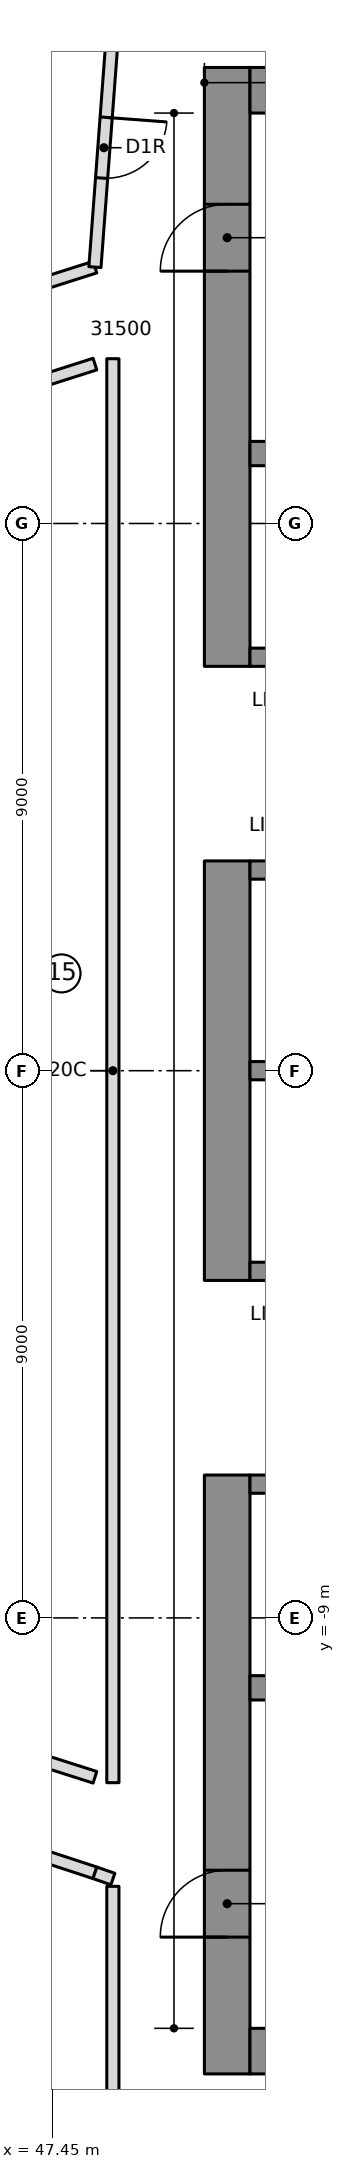
"""IFC4 building model, lengths in metres.
Left out: names, types, materials, properties, quantities, classifications, styles, units other than length and angle.
Written with IfcOpenShell. Run it as: python <this file> out.ifc"""

import sys

from ifc_helpers import new_model, si_unit, direction, frame, frame_2d, origin, place, context, subcontext, project, spatial, rectangle, extrude, element, fill, save


model = new_model("IFC4")
c1 = context("Model", 3, precision=1e-05, world=origin(), true_north=direction((0.0, 1.0)))
c2 = subcontext(c1, "Body", "Model", "MODEL_VIEW")
j1 = project(units=[si_unit("LENGTHUNIT", "METRE"), si_unit("PLANEANGLEUNIT", "RADIAN")], contexts=[c1])
p1 = place(None, origin())
s1 = spatial("IfcSite", under=j1, at=p1, CompositionType="ELEMENT")
p2 = place(p1, origin())
s2 = spatial("IfcBuilding", under=s1, at=p2, CompositionType="ELEMENT")
p3 = place(p2, frame((0.0, 0.0, 203.9)))
s3 = spatial("IfcBuildingStorey", under=s2, at=p3, CompositionType="ELEMENT", Elevation=203.9)
p4 = place(p3, frame((50.325, 6.65, 0.0), z_axis=(0.0, 0.0, 1.0), x_axis=(0.0, 1.0, 0.0)))
e1 = element("IfcWall", 1, at=p4, inside=s3, PredefinedType="SHEAR", context=c2, shape_type="SweptSolid", body=[
    extrude(rectangle(XDim=9.85, YDim=0.75, at=frame_2d((4.925, 0.0))), origin(), (0.0, 0.0, 1.0), 3.55),
])
p5 = place(p4, frame((6.5, 0.0, 0.0)))
e2 = element("IfcOpeningElement", 2, at=p5, cuts=e1, PredefinedType="OPENING", context=c2, shape_type="SweptSolid", body=[
    extrude(rectangle(XDim=1.1, YDim=2.1, at=frame_2d((0.55, 1.05))), frame((0.0, 0.385, 0.0), z_axis=(0.0, -1.0, 0.0), x_axis=(1.0, 0.0, 0.0)), (0.0, 0.0, 1.0), 0.77),
])
p6 = place(p3, frame((50.325, -3.45, 0.0), z_axis=(0.0, 0.0, 1.0), x_axis=(0.0, 1.0, 0.0)))
e3 = element("IfcWall", 3, at=p6, inside=s3, PredefinedType="SHEAR", context=c2, shape_type="SweptSolid", body=[
    extrude(rectangle(XDim=6.9, YDim=0.75, at=frame_2d((3.45, 0.0))), origin(), (0.0, 0.0, 1.0), 3.55),
])
p7 = place(p3, frame((50.325, -16.5, 0.0), z_axis=(0.0, 0.0, 1.0), x_axis=(0.0, 1.0, 0.0)))
e4 = element("IfcWall", 4, at=p7, inside=s3, PredefinedType="SHEAR", context=c2, shape_type="SweptSolid", body=[
    extrude(rectangle(XDim=9.85, YDim=0.75, at=frame_2d((4.925, 0.0))), origin(), (0.0, 0.0, 1.0), 3.55),
])
p8 = place(p7, frame((2.25, 0.0, 0.0)))
e5 = element("IfcOpeningElement", 5, at=p8, cuts=e4, PredefinedType="OPENING", context=c2, shape_type="SweptSolid", body=[
    extrude(rectangle(XDim=1.1, YDim=2.1, at=frame_2d((0.55, 1.05))), frame((0.0, 0.385, 0.0), z_axis=(0.0, -1.0, 0.0), x_axis=(1.0, 0.0, 0.0)), (0.0, 0.0, 1.0), 0.77),
])
for number, where, z_axis, x_axis in (
    (6, (50.7, 16.125, 0.0), (0.0, 0.0, 1.0), (1.0, 0.0, 0.0)),
    (7, (50.7, -16.125, 0.0), (0.0, 0.0, 1.0), (1.0, 0.0, 0.0)),
):
    element("IfcWall", number, at=place(p3, frame(where, z_axis=z_axis, x_axis=x_axis)), inside=s3, PredefinedType="SHEAR", context=c2, shape_type="SweptSolid", body=[
        extrude(rectangle(XDim=13.77, YDim=0.75, at=frame_2d((6.885, 0.0))), origin(), (0.0, 0.0, 1.0), 3.55),
    ])
p9 = place(p3, frame((50.7, 10.15, 0.0), z_axis=(0.0, 0.0, 1.0), x_axis=(1.0, 0.0, 0.0)))
e8 = element("IfcWall", 8, at=p9, inside=s3, PredefinedType="SHEAR", context=c2, shape_type="SweptSolid", body=[
    extrude(rectangle(XDim=13.02, YDim=0.4, at=frame_2d((6.51, 0.0))), origin(), (0.0, 0.0, 1.0), 3.55),
])
p10 = place(p9, frame((0.7, 0.0, 0.0)))
e9 = element("IfcOpeningElement", 9, at=p10, cuts=e8, PredefinedType="OPENING", context=c2, shape_type="SweptSolid", body=[
    extrude(rectangle(XDim=1.1, YDim=2.1, at=frame_2d((0.55, 1.05))), frame((0.0, 0.21, 0.0), z_axis=(0.0, -1.0, 0.0), x_axis=(1.0, 0.0, 0.0)), (0.0, 0.0, 1.0), 0.42),
])
p11 = place(p9, frame((3.5, 0.0, 0.0)))
e10 = element("IfcOpeningElement", 10, at=p11, cuts=e8, PredefinedType="OPENING", context=c2, shape_type="SweptSolid", body=[
    extrude(rectangle(XDim=1.1, YDim=2.1, at=frame_2d((0.55, 1.05))), frame((0.0, 0.21, 0.0), z_axis=(0.0, -1.0, 0.0), x_axis=(1.0, 0.0, 0.0)), (0.0, 0.0, 1.0), 0.42),
])
p12 = place(p3, frame((50.7, -10.15, 0.0), z_axis=(0.0, 0.0, 1.0), x_axis=(1.0, 0.0, 0.0)))
e11 = element("IfcWall", 11, at=p12, inside=s3, PredefinedType="SHEAR", context=c2, shape_type="SweptSolid", body=[
    extrude(rectangle(XDim=13.02, YDim=0.4, at=frame_2d((6.51, 0.0))), origin(), (0.0, 0.0, 1.0), 3.55),
])
p13 = place(p3, frame((50.7, 0.0, 0.0), z_axis=(0.0, 0.0, 1.0), x_axis=(1.0, 0.0, 0.0)))
e12 = element("IfcWall", 12, at=p13, inside=s3, PredefinedType="SHEAR", context=c2, shape_type="SweptSolid", body=[
    extrude(rectangle(XDim=10.9, YDim=0.3, at=frame_2d((5.45, 0.0))), origin(), (0.0, 0.0, 1.0), 3.55),
])
p14 = place(p3, frame((50.7, 3.3, 0.0), z_axis=(0.0, 0.0, 1.0), x_axis=(1.0, 0.0, 0.0)))
e13 = element("IfcWall", 13, at=p14, inside=s3, PredefinedType="SHEAR", context=c2, shape_type="SweptSolid", body=[
    extrude(rectangle(XDim=10.9, YDim=0.3, at=frame_2d((5.45, 0.0))), origin(), (0.0, 0.0, 1.0), 3.55),
])
p15 = place(p14, frame((0.7, 0.0, 0.0)))
e14 = element("IfcOpeningElement", 14, at=p15, cuts=e13, PredefinedType="OPENING", context=c2, shape_type="SweptSolid", body=[
    extrude(rectangle(XDim=1.1, YDim=2.1, at=frame_2d((0.55, 1.05))), frame((0.0, 0.16, 0.0), z_axis=(0.0, -1.0, 0.0), x_axis=(1.0, 0.0, 0.0)), (0.0, 0.0, 1.0), 0.32),
])
p16 = place(p14, frame((3.5, 0.0, 0.0)))
e15 = element("IfcOpeningElement", 15, at=p16, cuts=e13, PredefinedType="OPENING", context=c2, shape_type="SweptSolid", body=[
    extrude(rectangle(XDim=1.1, YDim=2.1, at=frame_2d((0.55, 1.05))), frame((0.0, 0.16, 0.0), z_axis=(0.0, -1.0, 0.0), x_axis=(1.0, 0.0, 0.0)), (0.0, 0.0, 1.0), 0.32),
])
p17 = place(p14, frame((6.3, 0.0, 0.0)))
e16 = element("IfcOpeningElement", 16, at=p17, cuts=e13, PredefinedType="OPENING", context=c2, shape_type="SweptSolid", body=[
    extrude(rectangle(XDim=1.1, YDim=2.1, at=frame_2d((0.55, 1.05))), frame((0.0, 0.16, 0.0), z_axis=(0.0, -1.0, 0.0), x_axis=(1.0, 0.0, 0.0)), (0.0, 0.0, 1.0), 0.32),
])
p18 = place(p14, frame((9.1, 0.0, 0.0)))
e17 = element("IfcOpeningElement", 17, at=p18, cuts=e13, PredefinedType="OPENING", context=c2, shape_type="SweptSolid", body=[
    extrude(rectangle(XDim=1.1, YDim=2.1, at=frame_2d((0.55, 1.05))), frame((0.0, 0.16, 0.0), z_axis=(0.0, -1.0, 0.0), x_axis=(1.0, 0.0, 0.0)), (0.0, 0.0, 1.0), 0.32),
])
p19 = place(p3, frame((50.7, 6.8, 0.0), z_axis=(0.0, 0.0, 1.0), x_axis=(1.0, 0.0, 0.0)))
e18 = element("IfcWall", 18, at=p19, inside=s3, PredefinedType="SHEAR", context=c2, shape_type="SweptSolid", body=[
    extrude(rectangle(XDim=10.9, YDim=0.3, at=frame_2d((5.45, 0.0))), origin(), (0.0, 0.0, 1.0), 3.55),
])
p20 = place(p19, frame((6.4, 0.0, 0.0)))
e19 = element("IfcOpeningElement", 19, at=p20, cuts=e18, PredefinedType="OPENING", context=c2, shape_type="SweptSolid", body=[
    extrude(rectangle(XDim=0.9, YDim=2.1, at=frame_2d((0.45, 1.05))), frame((0.0, 0.16, 0.0), z_axis=(0.0, -1.0, 0.0), x_axis=(1.0, 0.0, 0.0)), (0.0, 0.0, 1.0), 0.32),
])
p21 = place(p19, frame((9.2, 0.0, 0.0)))
e20 = element("IfcOpeningElement", 20, at=p21, cuts=e18, PredefinedType="OPENING", context=c2, shape_type="SweptSolid", body=[
    extrude(rectangle(XDim=0.9, YDim=2.1, at=frame_2d((0.45, 1.05))), frame((0.0, 0.16, 0.0), z_axis=(0.0, -1.0, 0.0), x_axis=(1.0, 0.0, 0.0)), (0.0, 0.0, 1.0), 0.32),
])
p22 = place(p3, frame((50.7, -3.3, 0.0), z_axis=(0.0, 0.0, 1.0), x_axis=(1.0, 0.0, 0.0)))
e21 = element("IfcWall", 21, at=p22, inside=s3, PredefinedType="SHEAR", context=c2, shape_type="SweptSolid", body=[
    extrude(rectangle(XDim=10.9, YDim=0.3, at=frame_2d((5.45, 0.0))), origin(), (0.0, 0.0, 1.0), 3.55),
])
p23 = place(p22, frame((9.1, 0.0, 0.0)))
e22 = element("IfcOpeningElement", 22, at=p23, cuts=e21, PredefinedType="OPENING", context=c2, shape_type="SweptSolid", body=[
    extrude(rectangle(XDim=1.1, YDim=2.1, at=frame_2d((0.55, 1.05))), frame((0.0, 0.16, 0.0), z_axis=(0.0, -1.0, 0.0), x_axis=(1.0, 0.0, 0.0)), (0.0, 0.0, 1.0), 0.32),
])
p24 = place(p3, frame((50.7, -6.8, 0.0), z_axis=(0.0, 0.0, 1.0), x_axis=(1.0, 0.0, 0.0)))
e23 = element("IfcWall", 23, at=p24, inside=s3, PredefinedType="SHEAR", context=c2, shape_type="SweptSolid", body=[
    extrude(rectangle(XDim=10.9, YDim=0.3, at=frame_2d((5.45, 0.0))), origin(), (0.0, 0.0, 1.0), 3.55),
])
p25 = place(p24, frame((6.3, 0.0, 0.0)))
e24 = element("IfcOpeningElement", 24, at=p25, cuts=e23, PredefinedType="OPENING", context=c2, shape_type="SweptSolid", body=[
    extrude(rectangle(XDim=1.1, YDim=2.1, at=frame_2d((0.55, 1.05))), frame((0.0, 0.16, 0.0), z_axis=(0.0, -1.0, 0.0), x_axis=(1.0, 0.0, 0.0)), (0.0, 0.0, 1.0), 0.32),
])
p26 = place(p24, frame((9.1, 0.0, 0.0)))
e25 = element("IfcOpeningElement", 25, at=p26, cuts=e23, PredefinedType="OPENING", context=c2, shape_type="SweptSolid", body=[
    extrude(rectangle(XDim=1.1, YDim=2.1, at=frame_2d((0.55, 1.05))), frame((0.0, 0.16, 0.0), z_axis=(0.0, -1.0, 0.0), x_axis=(1.0, 0.0, 0.0)), (0.0, 0.0, 1.0), 0.32),
])
p27 = place(p24, frame((0.8, 0.0, 0.0)))
e26 = element("IfcOpeningElement", 26, at=p27, cuts=e23, PredefinedType="OPENING", context=c2, shape_type="SweptSolid", body=[
    extrude(rectangle(XDim=0.9, YDim=2.1, at=frame_2d((0.45, 1.05))), frame((0.0, 0.16, 0.0), z_axis=(0.0, -1.0, 0.0), x_axis=(1.0, 0.0, 0.0)), (0.0, 0.0, 1.0), 0.32),
])
p28 = place(p24, frame((3.6, 0.0, 0.0)))
e27 = element("IfcOpeningElement", 27, at=p28, cuts=e23, PredefinedType="OPENING", context=c2, shape_type="SweptSolid", body=[
    extrude(rectangle(XDim=0.9, YDim=2.1, at=frame_2d((0.45, 1.05))), frame((0.0, 0.16, 0.0), z_axis=(0.0, -1.0, 0.0), x_axis=(1.0, 0.0, 0.0)), (0.0, 0.0, 1.0), 0.32),
])
p29 = place(p3, frame((48.15, 13.217, 0.0), z_axis=(0.0, 0.0, 1.0), x_axis=(-0.952731090451, -0.303814860215, 0.0)))
e28 = element("IfcWall", 28, at=p29, inside=s3, PredefinedType="PARTITIONING", context=c2, shape_type="SweptSolid", body=[
    extrude(rectangle(XDim=1.088, YDim=0.2, at=frame_2d((0.544, 0.0))), origin(), (0.0, 0.0, 1.0), 3.25),
])
p30 = place(p3, frame((43.026, -11.507, 0.0), z_axis=(0.0, 0.0, 1.0), x_axis=(0.949951949432, -0.312396052744, 0.0)))
e29 = element("IfcWall", 29, at=p30, inside=s3, PredefinedType="PARTITIONING", context=c2, shape_type="SweptSolid", body=[
    extrude(rectangle(XDim=5.394, YDim=0.2, at=frame_2d((2.697, 0.0))), origin(), (0.0, 0.0, 1.0), 3.25),
])
p31 = place(p30, frame((3.05, 0.0, 0.0)))
e30 = element("IfcOpeningElement", 30, at=p31, cuts=e29, PredefinedType="OPENING", context=c2, shape_type="SweptSolid", body=[
    extrude(rectangle(XDim=1.0, YDim=2.1, at=frame_2d((0.5, 1.05))), frame((0.0, 0.11, 0.0), z_axis=(0.0, -1.0, 0.0), x_axis=(1.0, 0.0, 0.0)), (0.0, 0.0, 1.0), 0.22),
])
for number, where, z_axis, x_axis in (
    (31, (46.881, 11.217, 0.0), (0.0, 0.0, 1.0), (0.953, 0.304, 0.0)),
    (32, (48.15, -11.621, 0.0), (0.0, 0.0, 1.0), (-0.953, 0.304, 0.0)),
):
    element("IfcWall", number, at=place(p3, frame(where, z_axis=z_axis, x_axis=x_axis)), inside=s3, PredefinedType="PARTITIONING", context=c2, shape_type="SweptSolid", body=[
        extrude(rectangle(XDim=1.332, YDim=0.2, at=frame_2d((0.666, 0.0))), origin(), (0.0, 0.0, 1.0), 3.25),
    ])
p32 = place(p3, frame((48.445, 17.145, 0.0), z_axis=(0.0, 0.0, 1.0), x_axis=(-0.074933243819, -0.997188552366, 0.0)))
e33 = element("IfcWall", 33, at=p32, inside=s3, PredefinedType="PARTITIONING", context=c2, shape_type="SweptSolid", body=[
    extrude(rectangle(XDim=3.939, YDim=0.2, at=frame_2d((1.969, 0.0))), origin(), (0.0, 0.0, 1.0), 3.25),
])
p33 = place(p32, frame((1.47, 0.0, 0.0)))
e34 = element("IfcOpeningElement", 34, at=p33, cuts=e33, PredefinedType="OPENING", context=c2, shape_type="SweptSolid", body=[
    extrude(rectangle(XDim=1.0, YDim=2.1, at=frame_2d((0.5, 1.05))), frame((0.0, 0.11, 0.0), z_axis=(0.0, -1.0, 0.0), x_axis=(1.0, 0.0, 0.0)), (0.0, 0.0, 1.0), 0.22),
])
p34 = place(p3, frame((48.445, 11.71, 0.0), z_axis=(0.0, 0.0, 1.0), x_axis=(0.0, -1.0, 0.0)))
e35 = element("IfcWall", 35, at=p34, inside=s3, PredefinedType="PARTITIONING", context=c2, shape_type="SweptSolid", body=[
    extrude(rectangle(XDim=23.42, YDim=0.2, at=frame_2d((11.71, 0.0))), origin(), (0.0, 0.0, 1.0), 3.25),
])
p35 = place(p3, frame((48.15, -13.192, 0.0), z_axis=(0.0, 0.0, 1.0), x_axis=(0.944623214561, -0.328156947987, 0.0)))
e36 = element("IfcWall", 36, at=p35, inside=s3, PredefinedType="PARTITIONING", context=c2, shape_type="SweptSolid", body=[
    extrude(rectangle(XDim=0.312, YDim=0.2, at=frame_2d((0.156, 0.0))), origin(), (0.0, 0.0, 1.0), 3.25),
])
p36 = place(p3, frame((48.445, -13.415, 0.0), z_axis=(0.0, 0.0, 1.0), x_axis=(0.0, -1.0, 0.0)))
e37 = element("IfcWall", 37, at=p36, inside=s3, PredefinedType="PARTITIONING", context=c2, shape_type="SweptSolid", body=[
    extrude(rectangle(XDim=6.935, YDim=0.2, at=frame_2d((3.468, 0.0))), origin(), (0.0, 0.0, 1.0), 3.25),
])
p37 = place(p33, origin())
e38 = element("IfcDoor", 38, at=p37, inside=s3, OperationType="SINGLE_SWING_RIGHT", PredefinedType="DOOR", context=c2, shape_type="SweptSolid", body=[
    extrude(rectangle(XDim=1.0, YDim=2.1, at=frame_2d((0.5, 1.05))), frame((0.0, 0.025, 0.0), z_axis=(0.0, -1.0, 0.0), x_axis=(1.0, 0.0, 0.0)), (0.0, 0.0, 1.0), 0.05),
])
fill(e34, e38)
p38 = place(p5, origin())
e39 = element("IfcDoor", 39, at=p38, inside=s3, OperationType="SINGLE_SWING_RIGHT", PredefinedType="DOOR", context=c2, shape_type="SweptSolid", body=[
    extrude(rectangle(XDim=1.1, YDim=2.1, at=frame_2d((0.55, 1.05))), frame((0.0, 0.025, 0.0), z_axis=(0.0, -1.0, 0.0), x_axis=(1.0, 0.0, 0.0)), (0.0, 0.0, 1.0), 0.05),
])
fill(e2, e39)
p39 = place(p8, origin())
e40 = element("IfcDoor", 40, at=p39, inside=s3, OperationType="SINGLE_SWING_RIGHT", PredefinedType="DOOR", context=c2, shape_type="SweptSolid", body=[
    extrude(rectangle(XDim=1.1, YDim=2.1, at=frame_2d((0.55, 1.05))), frame((0.0, 0.025, 0.0), z_axis=(0.0, -1.0, 0.0), x_axis=(1.0, 0.0, 0.0)), (0.0, 0.0, 1.0), 0.05),
])
fill(e5, e40)
save(model, sys.argv[1])
